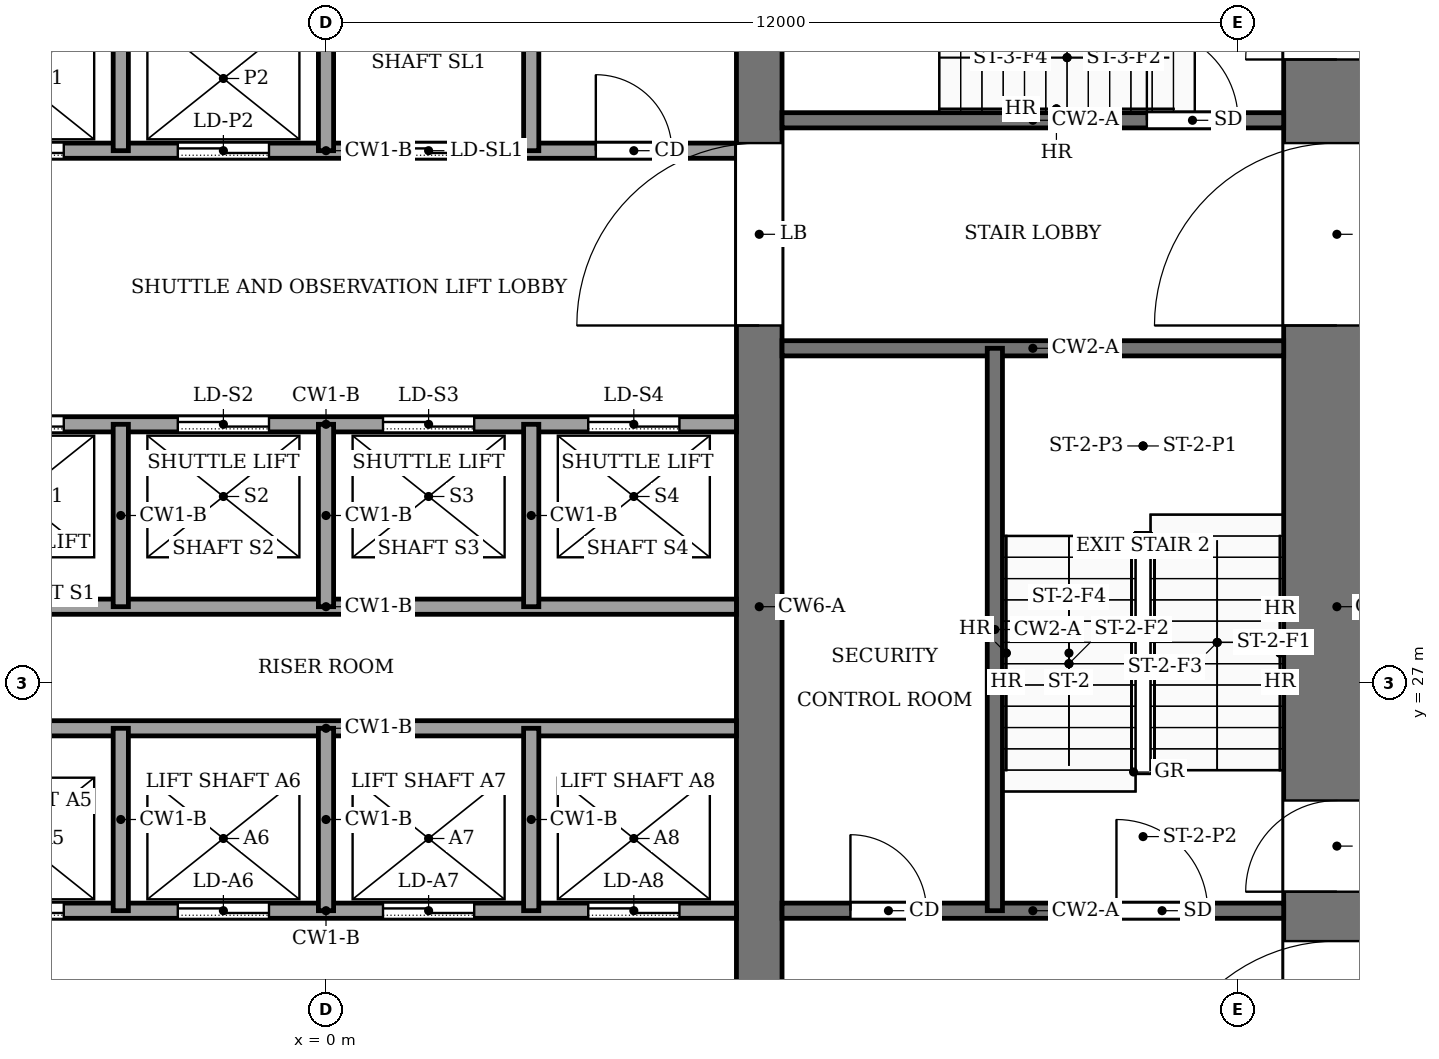
"""IFC4 building model, lengths in metres.
Left out: names, types, materials, properties, quantities, classifications, styles, units other than length and angle.
Written with IfcOpenShell. Run it as: python <this file> out.ifc"""

import sys

from ifc_helpers import new_model, si_unit, direction, frame, frame_2d, origin, place, context, subcontext, project, spatial, rectangle, extrude, element, fill, save


model = new_model("IFC4")
c1 = context("Model", 3, precision=1e-05, world=origin(), true_north=direction((0.0, 1.0)))
c2 = subcontext(c1, "Body", "Model", "MODEL_VIEW")
j1 = project(units=[si_unit("LENGTHUNIT", "METRE"), si_unit("PLANEANGLEUNIT", "RADIAN")], contexts=[c1])
p1 = place(None, origin())
s1 = spatial("IfcSite", under=j1, at=p1, CompositionType="ELEMENT")
p2 = place(p1, origin())
s2 = spatial("IfcBuilding", under=s1, at=p2, CompositionType="ELEMENT")
p3 = place(p2, origin())
s3 = spatial("IfcBuildingStorey", under=s2, at=p3, CompositionType="ELEMENT", Elevation=0.0)
p4 = place(p3, frame((13.3, 18.4, -0.45), z_axis=(0.0, 0.0, 1.0), x_axis=(0.0, 1.0, 0.0)))
e1 = element("IfcWall", 1, at=p4, inside=s3, PredefinedType="SHEAR", context=c2, shape_type="SweptSolid", body=[
    extrude(rectangle(XDim=19.2, YDim=1.4, at=frame_2d((9.6, 0.0))), origin(), (0.0, 0.0, 1.0), 9.32),
])
p5 = place(p4, frame((2.8, 0.0, 0.45)))
e2 = element("IfcOpeningElement", 2, at=p5, cuts=e1, PredefinedType="OPENING", context=c2, shape_type="SweptSolid", body=[
    extrude(rectangle(XDim=2.4, YDim=2.4, at=frame_2d((1.2, 1.2))), frame((0.0, 0.71, 0.0), z_axis=(0.0, -1.0, 0.0), x_axis=(1.0, 0.0, 0.0)), (0.0, 0.0, 1.0), 1.42),
])
p6 = place(p4, frame((13.3, 0.0, 0.45)))
e3 = element("IfcOpeningElement", 3, at=p6, cuts=e1, PredefinedType="OPENING", context=c2, shape_type="SweptSolid", body=[
    extrude(rectangle(XDim=2.4, YDim=2.4, at=frame_2d((1.2, 1.2))), frame((0.0, 0.71, 0.0), z_axis=(0.0, -1.0, 0.0), x_axis=(1.0, 0.0, 0.0)), (0.0, 0.0, 1.0), 1.42),
])
p7 = place(p4, frame((5.85, 0.0, 0.45)))
e4 = element("IfcOpeningElement", 4, at=p7, cuts=e1, PredefinedType="OPENING", context=c2, shape_type="SweptSolid", body=[
    extrude(rectangle(XDim=1.2, YDim=2.2, at=frame_2d((0.6, 1.1))), frame((0.0, 0.71, 0.0), z_axis=(0.0, -1.0, 0.0), x_axis=(1.0, 0.0, 0.0)), (0.0, 0.0, 1.0), 1.42),
])
p8 = place(p4, frame((16.8, 0.0, 0.45)))
e5 = element("IfcOpeningElement", 5, at=p8, cuts=e1, PredefinedType="OPENING", context=c2, shape_type="SweptSolid", body=[
    extrude(rectangle(XDim=1.2, YDim=2.2, at=frame_2d((0.6, 1.1))), frame((0.0, 0.71, 0.0), z_axis=(0.0, -1.0, 0.0), x_axis=(1.0, 0.0, 0.0)), (0.0, 0.0, 1.0), 1.42),
])
p9 = place(p3, frame((5.7, 18.4, -0.45), z_axis=(0.0, 0.0, 1.0), x_axis=(0.0, 1.0, 0.0)))
e6 = element("IfcWall", 6, at=p9, inside=s3, PredefinedType="SHEAR", context=c2, shape_type="SweptSolid", body=[
    extrude(rectangle(XDim=19.2, YDim=0.6, at=frame_2d((9.6, 0.0))), origin(), (0.0, 0.0, 1.0), 9.32),
])
p10 = place(p9, frame((13.3, 0.0, 0.45)))
e7 = element("IfcOpeningElement", 7, at=p10, cuts=e6, PredefinedType="OPENING", context=c2, shape_type="SweptSolid", body=[
    extrude(rectangle(XDim=2.4, YDim=2.4, at=frame_2d((1.2, 1.2))), frame((0.0, 0.31, 0.0), z_axis=(0.0, -1.0, 0.0), x_axis=(1.0, 0.0, 0.0)), (0.0, 0.0, 1.0), 0.62),
])
p11 = place(p3, frame((-5.4, 24.0, 0.0), z_axis=(0.0, 0.0, 1.0), x_axis=(1.0, 0.0, 0.0)))
e8 = element("IfcWall", 8, at=p11, inside=s3, PredefinedType="PARTITIONING", context=c2, shape_type="SweptSolid", body=[
    extrude(rectangle(XDim=10.8, YDim=0.2, at=frame_2d((5.4, 0.0))), origin(), (0.0, 0.0, 1.0), 8.87),
])
p12 = place(p11, frame((0.75, 0.0, 0.0)))
e9 = element("IfcOpeningElement", 9, at=p12, cuts=e8, PredefinedType="OPENING", context=c2, shape_type="SweptSolid", body=[
    extrude(rectangle(XDim=1.2, YDim=2.2, at=frame_2d((0.6, 1.1))), frame((0.0, 0.11, 0.0), z_axis=(0.0, -1.0, 0.0), x_axis=(1.0, 0.0, 0.0)), (0.0, 0.0, 1.0), 0.22),
])
p13 = place(p11, frame((3.45, 0.0, 0.0)))
e10 = element("IfcOpeningElement", 10, at=p13, cuts=e8, PredefinedType="OPENING", context=c2, shape_type="SweptSolid", body=[
    extrude(rectangle(XDim=1.2, YDim=2.2, at=frame_2d((0.6, 1.1))), frame((0.0, 0.11, 0.0), z_axis=(0.0, -1.0, 0.0), x_axis=(1.0, 0.0, 0.0)), (0.0, 0.0, 1.0), 0.22),
])
p14 = place(p11, frame((6.15, 0.0, 0.0)))
e11 = element("IfcOpeningElement", 11, at=p14, cuts=e8, PredefinedType="OPENING", context=c2, shape_type="SweptSolid", body=[
    extrude(rectangle(XDim=1.2, YDim=2.2, at=frame_2d((0.6, 1.1))), frame((0.0, 0.11, 0.0), z_axis=(0.0, -1.0, 0.0), x_axis=(1.0, 0.0, 0.0)), (0.0, 0.0, 1.0), 0.22),
])
p15 = place(p11, frame((8.85, 0.0, 0.0)))
e12 = element("IfcOpeningElement", 12, at=p15, cuts=e8, PredefinedType="OPENING", context=c2, shape_type="SweptSolid", body=[
    extrude(rectangle(XDim=1.2, YDim=2.2, at=frame_2d((0.6, 1.1))), frame((0.0, 0.11, 0.0), z_axis=(0.0, -1.0, 0.0), x_axis=(1.0, 0.0, 0.0)), (0.0, 0.0, 1.0), 0.22),
])
p16 = place(p3, frame((6.0, 24.0, 0.0), z_axis=(0.0, 0.0, 1.0), x_axis=(1.0, 0.0, 0.0)))
e13 = element("IfcWall", 13, at=p16, inside=s3, PredefinedType="PARTITIONING", context=c2, shape_type="SweptSolid", body=[
    extrude(rectangle(XDim=6.6, YDim=0.2, at=frame_2d((3.3, 0.0))), origin(), (0.0, 0.0, 1.0), 8.87),
])
p17 = place(p16, frame((0.9, 0.0, 0.0)))
e14 = element("IfcOpeningElement", 14, at=p17, cuts=e13, PredefinedType="OPENING", context=c2, shape_type="SweptSolid", body=[
    extrude(rectangle(XDim=1.0, YDim=2.1, at=frame_2d((0.5, 1.05))), frame((0.0, 0.11, 0.0), z_axis=(0.0, -1.0, 0.0), x_axis=(1.0, 0.0, 0.0)), (0.0, 0.0, 1.0), 0.22),
])
p18 = place(p16, frame((4.4, 0.0, 0.0)))
e15 = element("IfcOpeningElement", 15, at=p18, cuts=e13, PredefinedType="OPENING", context=c2, shape_type="SweptSolid", body=[
    extrude(rectangle(XDim=1.2, YDim=2.2, at=frame_2d((0.6, 1.1))), frame((0.0, 0.11, 0.0), z_axis=(0.0, -1.0, 0.0), x_axis=(1.0, 0.0, 0.0)), (0.0, 0.0, 1.0), 0.22),
])
for number, where, z_axis, x_axis in (
    (16, (-5.4, 26.4, 0.0), (0.0, 0.0, 1.0), (1.0, 0.0, 0.0)),
    (17, (-5.4, 28.0, 0.0), (0.0, 0.0, 1.0), (1.0, 0.0, 0.0)),
):
    element("IfcWall", number, at=place(p3, frame(where, z_axis=z_axis, x_axis=x_axis)), inside=s3, PredefinedType="PARTITIONING", context=c2, shape_type="SweptSolid", body=[
        extrude(rectangle(XDim=10.8, YDim=0.2, at=frame_2d((5.4, 0.0))), origin(), (0.0, 0.0, 1.0), 8.87),
    ])
p19 = place(p3, frame((-5.4, 30.4, 0.0), z_axis=(0.0, 0.0, 1.0), x_axis=(1.0, 0.0, 0.0)))
e18 = element("IfcWall", 18, at=p19, inside=s3, PredefinedType="PARTITIONING", context=c2, shape_type="SweptSolid", body=[
    extrude(rectangle(XDim=10.8, YDim=0.2, at=frame_2d((5.4, 0.0))), origin(), (0.0, 0.0, 1.0), 8.87),
])
p20 = place(p19, frame((0.75, 0.0, 0.0)))
e19 = element("IfcOpeningElement", 19, at=p20, cuts=e18, PredefinedType="OPENING", context=c2, shape_type="SweptSolid", body=[
    extrude(rectangle(XDim=1.2, YDim=2.2, at=frame_2d((0.6, 1.1))), frame((0.0, 0.11, 0.0), z_axis=(0.0, -1.0, 0.0), x_axis=(1.0, 0.0, 0.0)), (0.0, 0.0, 1.0), 0.22),
])
p21 = place(p19, frame((3.45, 0.0, 0.0)))
e20 = element("IfcOpeningElement", 20, at=p21, cuts=e18, PredefinedType="OPENING", context=c2, shape_type="SweptSolid", body=[
    extrude(rectangle(XDim=1.2, YDim=2.2, at=frame_2d((0.6, 1.1))), frame((0.0, 0.11, 0.0), z_axis=(0.0, -1.0, 0.0), x_axis=(1.0, 0.0, 0.0)), (0.0, 0.0, 1.0), 0.22),
])
p22 = place(p19, frame((6.15, 0.0, 0.0)))
e21 = element("IfcOpeningElement", 21, at=p22, cuts=e18, PredefinedType="OPENING", context=c2, shape_type="SweptSolid", body=[
    extrude(rectangle(XDim=1.2, YDim=2.2, at=frame_2d((0.6, 1.1))), frame((0.0, 0.11, 0.0), z_axis=(0.0, -1.0, 0.0), x_axis=(1.0, 0.0, 0.0)), (0.0, 0.0, 1.0), 0.22),
])
p23 = place(p19, frame((8.85, 0.0, 0.0)))
e22 = element("IfcOpeningElement", 22, at=p23, cuts=e18, PredefinedType="OPENING", context=c2, shape_type="SweptSolid", body=[
    extrude(rectangle(XDim=1.2, YDim=2.2, at=frame_2d((0.6, 1.1))), frame((0.0, 0.11, 0.0), z_axis=(0.0, -1.0, 0.0), x_axis=(1.0, 0.0, 0.0)), (0.0, 0.0, 1.0), 0.22),
])
p24 = place(p3, frame((6.0, 31.4, 0.0), z_axis=(0.0, 0.0, 1.0), x_axis=(1.0, 0.0, 0.0)))
e23 = element("IfcWall", 23, at=p24, inside=s3, PredefinedType="PARTITIONING", context=c2, shape_type="SweptSolid", body=[
    extrude(rectangle(XDim=6.6, YDim=0.2, at=frame_2d((3.3, 0.0))), origin(), (0.0, 0.0, 1.0), 8.87),
])
p25 = place(p3, frame((-5.4, 34.0, 0.0), z_axis=(0.0, 0.0, 1.0), x_axis=(1.0, 0.0, 0.0)))
e24 = element("IfcWall", 24, at=p25, inside=s3, PredefinedType="PARTITIONING", context=c2, shape_type="SweptSolid", body=[
    extrude(rectangle(XDim=10.8, YDim=0.2, at=frame_2d((5.4, 0.0))), origin(), (0.0, 0.0, 1.0), 8.87),
])
p26 = place(p25, frame((0.75, 0.0, 0.0)))
e25 = element("IfcOpeningElement", 25, at=p26, cuts=e24, PredefinedType="OPENING", context=c2, shape_type="SweptSolid", body=[
    extrude(rectangle(XDim=1.2, YDim=2.2, at=frame_2d((0.6, 1.1))), frame((0.0, 0.11, 0.0), z_axis=(0.0, -1.0, 0.0), x_axis=(1.0, 0.0, 0.0)), (0.0, 0.0, 1.0), 0.22),
])
p27 = place(p25, frame((3.45, 0.0, 0.0)))
e26 = element("IfcOpeningElement", 26, at=p27, cuts=e24, PredefinedType="OPENING", context=c2, shape_type="SweptSolid", body=[
    extrude(rectangle(XDim=1.2, YDim=2.2, at=frame_2d((0.6, 1.1))), frame((0.0, 0.11, 0.0), z_axis=(0.0, -1.0, 0.0), x_axis=(1.0, 0.0, 0.0)), (0.0, 0.0, 1.0), 0.22),
])
p28 = place(p25, frame((6.15, 0.0, 0.0)))
e27 = element("IfcOpeningElement", 27, at=p28, cuts=e24, PredefinedType="OPENING", context=c2, shape_type="SweptSolid", body=[
    extrude(rectangle(XDim=1.2, YDim=2.2, at=frame_2d((0.6, 1.1))), frame((0.0, 0.11, 0.0), z_axis=(0.0, -1.0, 0.0), x_axis=(1.0, 0.0, 0.0)), (0.0, 0.0, 1.0), 0.22),
])
p29 = place(p25, frame((8.95, 0.0, 0.0)))
e28 = element("IfcOpeningElement", 28, at=p29, cuts=e24, PredefinedType="OPENING", context=c2, shape_type="SweptSolid", body=[
    extrude(rectangle(XDim=1.0, YDim=2.1, at=frame_2d((0.5, 1.05))), frame((0.0, 0.11, 0.0), z_axis=(0.0, -1.0, 0.0), x_axis=(1.0, 0.0, 0.0)), (0.0, 0.0, 1.0), 0.22),
])
p30 = place(p3, frame((6.0, 34.4, 0.0), z_axis=(0.0, 0.0, 1.0), x_axis=(1.0, 0.0, 0.0)))
e29 = element("IfcWall", 29, at=p30, inside=s3, PredefinedType="PARTITIONING", context=c2, shape_type="SweptSolid", body=[
    extrude(rectangle(XDim=6.6, YDim=0.2, at=frame_2d((3.3, 0.0))), origin(), (0.0, 0.0, 1.0), 8.87),
])
p31 = place(p30, frame((4.8, 0.0, 0.0)))
e30 = element("IfcOpeningElement", 30, at=p31, cuts=e29, PredefinedType="OPENING", context=c2, shape_type="SweptSolid", body=[
    extrude(rectangle(XDim=1.2, YDim=2.2, at=frame_2d((0.6, 1.1))), frame((0.0, 0.11, 0.0), z_axis=(0.0, -1.0, 0.0), x_axis=(1.0, 0.0, 0.0)), (0.0, 0.0, 1.0), 0.22),
])
for number, where, z_axis, x_axis in (
    (31, (-2.7, 24.0, 0.0), (0.0, 0.0, 1.0), (0.0, 1.0, 0.0)),
    (32, (-2.7, 28.0, 0.0), (0.0, 0.0, 1.0), (0.0, 1.0, 0.0)),
):
    element("IfcWall", number, at=place(p3, frame(where, z_axis=z_axis, x_axis=x_axis)), inside=s3, PredefinedType="PARTITIONING", context=c2, shape_type="SweptSolid", body=[
        extrude(rectangle(XDim=2.4, YDim=0.2, at=frame_2d((1.2, 0.0))), origin(), (0.0, 0.0, 1.0), 8.87),
    ])
p32 = place(p3, frame((-2.7, 34.0, 0.0), z_axis=(0.0, 0.0, 1.0), x_axis=(0.0, 1.0, 0.0)))
e33 = element("IfcWall", 33, at=p32, inside=s3, PredefinedType="PARTITIONING", context=c2, shape_type="SweptSolid", body=[
    extrude(rectangle(XDim=3.6, YDim=0.2, at=frame_2d((1.8, 0.0))), origin(), (0.0, 0.0, 1.0), 8.87),
])
for number, where, z_axis, x_axis in (
    (34, (0.0, 24.0, 0.0), (0.0, 0.0, 1.0), (0.0, 1.0, 0.0)),
    (35, (0.0, 28.0, 0.0), (0.0, 0.0, 1.0), (0.0, 1.0, 0.0)),
):
    element("IfcWall", number, at=place(p3, frame(where, z_axis=z_axis, x_axis=x_axis)), inside=s3, PredefinedType="PARTITIONING", context=c2, shape_type="SweptSolid", body=[
        extrude(rectangle(XDim=2.4, YDim=0.2, at=frame_2d((1.2, 0.0))), origin(), (0.0, 0.0, 1.0), 8.87),
    ])
p33 = place(p3, frame((0.0, 34.0, 0.0), z_axis=(0.0, 0.0, 1.0), x_axis=(0.0, 1.0, 0.0)))
e36 = element("IfcWall", 36, at=p33, inside=s3, PredefinedType="PARTITIONING", context=c2, shape_type="SweptSolid", body=[
    extrude(rectangle(XDim=3.6, YDim=0.2, at=frame_2d((1.8, 0.0))), origin(), (0.0, 0.0, 1.0), 8.87),
])
for number, where, z_axis, x_axis in (
    (37, (2.7, 24.0, 0.0), (0.0, 0.0, 1.0), (0.0, 1.0, 0.0)),
    (38, (2.7, 28.0, 0.0), (0.0, 0.0, 1.0), (0.0, 1.0, 0.0)),
):
    element("IfcWall", number, at=place(p3, frame(where, z_axis=z_axis, x_axis=x_axis)), inside=s3, PredefinedType="PARTITIONING", context=c2, shape_type="SweptSolid", body=[
        extrude(rectangle(XDim=2.4, YDim=0.2, at=frame_2d((1.2, 0.0))), origin(), (0.0, 0.0, 1.0), 8.87),
    ])
p34 = place(p3, frame((2.7, 34.0, 0.0), z_axis=(0.0, 0.0, 1.0), x_axis=(0.0, 1.0, 0.0)))
e39 = element("IfcWall", 39, at=p34, inside=s3, PredefinedType="PARTITIONING", context=c2, shape_type="SweptSolid", body=[
    extrude(rectangle(XDim=3.6, YDim=0.2, at=frame_2d((1.8, 0.0))), origin(), (0.0, 0.0, 1.0), 8.87),
])
p35 = place(p3, frame((8.8, 24.0, 0.0), z_axis=(0.0, 0.0, 1.0), x_axis=(0.0, 1.0, 0.0)))
e40 = element("IfcWall", 40, at=p35, inside=s3, PredefinedType="PARTITIONING", context=c2, shape_type="SweptSolid", body=[
    extrude(rectangle(XDim=7.4, YDim=0.2, at=frame_2d((3.7, 0.0))), origin(), (0.0, 0.0, 1.0), 8.87),
])
p36 = place(p12, origin())
e41 = element("IfcDoor", 41, at=p36, inside=s3, OperationType="SLIDING_TO_LEFT", PredefinedType="DOOR", context=c2, shape_type="SweptSolid", body=[
    extrude(rectangle(XDim=1.2, YDim=2.2, at=frame_2d((0.6, 1.1))), frame((0.0, 0.025, 0.0), z_axis=(0.0, -1.0, 0.0), x_axis=(1.0, 0.0, 0.0)), (0.0, 0.0, 1.0), 0.05),
])
fill(e9, e41)
p37 = place(p13, origin())
e42 = element("IfcDoor", 42, at=p37, inside=s3, OperationType="SLIDING_TO_LEFT", PredefinedType="DOOR", context=c2, shape_type="SweptSolid", body=[
    extrude(rectangle(XDim=1.2, YDim=2.2, at=frame_2d((0.6, 1.1))), frame((0.0, 0.025, 0.0), z_axis=(0.0, -1.0, 0.0), x_axis=(1.0, 0.0, 0.0)), (0.0, 0.0, 1.0), 0.05),
])
fill(e10, e42)
p38 = place(p14, origin())
e43 = element("IfcDoor", 43, at=p38, inside=s3, OperationType="SLIDING_TO_LEFT", PredefinedType="DOOR", context=c2, shape_type="SweptSolid", body=[
    extrude(rectangle(XDim=1.2, YDim=2.2, at=frame_2d((0.6, 1.1))), frame((0.0, 0.025, 0.0), z_axis=(0.0, -1.0, 0.0), x_axis=(1.0, 0.0, 0.0)), (0.0, 0.0, 1.0), 0.05),
])
fill(e11, e43)
p39 = place(p15, origin())
e44 = element("IfcDoor", 44, at=p39, inside=s3, OperationType="SLIDING_TO_LEFT", PredefinedType="DOOR", context=c2, shape_type="SweptSolid", body=[
    extrude(rectangle(XDim=1.2, YDim=2.2, at=frame_2d((0.6, 1.1))), frame((0.0, 0.025, 0.0), z_axis=(0.0, -1.0, 0.0), x_axis=(1.0, 0.0, 0.0)), (0.0, 0.0, 1.0), 0.05),
])
fill(e12, e44)
p40 = place(p20, origin())
e45 = element("IfcDoor", 45, at=p40, inside=s3, OperationType="SLIDING_TO_LEFT", PredefinedType="DOOR", context=c2, shape_type="SweptSolid", body=[
    extrude(rectangle(XDim=1.2, YDim=2.2, at=frame_2d((0.6, 1.1))), frame((0.0, 0.025, 0.0), z_axis=(0.0, -1.0, 0.0), x_axis=(1.0, 0.0, 0.0)), (0.0, 0.0, 1.0), 0.05),
])
fill(e19, e45)
p41 = place(p21, origin())
e46 = element("IfcDoor", 46, at=p41, inside=s3, OperationType="SLIDING_TO_LEFT", PredefinedType="DOOR", context=c2, shape_type="SweptSolid", body=[
    extrude(rectangle(XDim=1.2, YDim=2.2, at=frame_2d((0.6, 1.1))), frame((0.0, 0.025, 0.0), z_axis=(0.0, -1.0, 0.0), x_axis=(1.0, 0.0, 0.0)), (0.0, 0.0, 1.0), 0.05),
])
fill(e20, e46)
p42 = place(p22, origin())
e47 = element("IfcDoor", 47, at=p42, inside=s3, OperationType="SLIDING_TO_LEFT", PredefinedType="DOOR", context=c2, shape_type="SweptSolid", body=[
    extrude(rectangle(XDim=1.2, YDim=2.2, at=frame_2d((0.6, 1.1))), frame((0.0, 0.025, 0.0), z_axis=(0.0, -1.0, 0.0), x_axis=(1.0, 0.0, 0.0)), (0.0, 0.0, 1.0), 0.05),
])
fill(e21, e47)
p43 = place(p23, origin())
e48 = element("IfcDoor", 48, at=p43, inside=s3, OperationType="SLIDING_TO_LEFT", PredefinedType="DOOR", context=c2, shape_type="SweptSolid", body=[
    extrude(rectangle(XDim=1.2, YDim=2.2, at=frame_2d((0.6, 1.1))), frame((0.0, 0.025, 0.0), z_axis=(0.0, -1.0, 0.0), x_axis=(1.0, 0.0, 0.0)), (0.0, 0.0, 1.0), 0.05),
])
fill(e22, e48)
p44 = place(p26, origin())
e49 = element("IfcDoor", 49, at=p44, inside=s3, OperationType="SLIDING_TO_LEFT", PredefinedType="DOOR", context=c2, shape_type="SweptSolid", body=[
    extrude(rectangle(XDim=1.2, YDim=2.2, at=frame_2d((0.6, 1.1))), frame((0.0, 0.025, 0.0), z_axis=(0.0, -1.0, 0.0), x_axis=(1.0, 0.0, 0.0)), (0.0, 0.0, 1.0), 0.05),
])
fill(e25, e49)
p45 = place(p27, origin())
e50 = element("IfcDoor", 50, at=p45, inside=s3, OperationType="SLIDING_TO_LEFT", PredefinedType="DOOR", context=c2, shape_type="SweptSolid", body=[
    extrude(rectangle(XDim=1.2, YDim=2.2, at=frame_2d((0.6, 1.1))), frame((0.0, 0.025, 0.0), z_axis=(0.0, -1.0, 0.0), x_axis=(1.0, 0.0, 0.0)), (0.0, 0.0, 1.0), 0.05),
])
fill(e26, e50)
p46 = place(p28, origin())
e51 = element("IfcDoor", 51, at=p46, inside=s3, OperationType="SLIDING_TO_LEFT", PredefinedType="DOOR", context=c2, shape_type="SweptSolid", body=[
    extrude(rectangle(XDim=1.2, YDim=2.2, at=frame_2d((0.6, 1.1))), frame((0.0, 0.025, 0.0), z_axis=(0.0, -1.0, 0.0), x_axis=(1.0, 0.0, 0.0)), (0.0, 0.0, 1.0), 0.05),
])
fill(e27, e51)
p47 = place(p17, origin())
e52 = element("IfcDoor", 52, at=p47, inside=s3, OperationType="SINGLE_SWING_LEFT", PredefinedType="DOOR", context=c2, shape_type="SweptSolid", body=[
    extrude(rectangle(XDim=1.0, YDim=2.1, at=frame_2d((0.5, 1.05))), frame((0.0, 0.025, 0.0), z_axis=(0.0, -1.0, 0.0), x_axis=(1.0, 0.0, 0.0)), (0.0, 0.0, 1.0), 0.05),
])
fill(e14, e52)
p48 = place(p29, origin())
e53 = element("IfcDoor", 53, at=p48, inside=s3, OperationType="SINGLE_SWING_LEFT", PredefinedType="DOOR", context=c2, shape_type="SweptSolid", body=[
    extrude(rectangle(XDim=1.0, YDim=2.1, at=frame_2d((0.5, 1.05))), frame((0.0, 0.025, 0.0), z_axis=(0.0, -1.0, 0.0), x_axis=(1.0, 0.0, 0.0)), (0.0, 0.0, 1.0), 0.05),
])
fill(e28, e53)
p49 = place(p18, origin())
e54 = element("IfcDoor", 54, at=p49, inside=s3, OperationType="SINGLE_SWING_LEFT", PredefinedType="DOOR", context=c2, shape_type="SweptSolid", body=[
    extrude(rectangle(XDim=1.2, YDim=2.2, at=frame_2d((0.6, 1.1))), frame((0.0, 0.025, 0.0), z_axis=(0.0, -1.0, 0.0), x_axis=(1.0, 0.0, 0.0)), (0.0, 0.0, 1.0), 0.05),
])
fill(e15, e54)
p50 = place(p31, origin())
e55 = element("IfcDoor", 55, at=p50, inside=s3, OperationType="SINGLE_SWING_RIGHT", PredefinedType="DOOR", context=c2, shape_type="SweptSolid", body=[
    extrude(rectangle(XDim=1.2, YDim=2.2, at=frame_2d((0.6, 1.1))), frame((0.0, 0.025, 0.0), z_axis=(0.0, -1.0, 0.0), x_axis=(1.0, 0.0, 0.0)), (0.0, 0.0, 1.0), 0.05),
])
fill(e30, e55)
p51 = place(p10, origin())
e56 = element("IfcDoor", 56, at=p51, inside=s3, OperationType="DOUBLE_DOOR_SINGLE_SWING", PredefinedType="DOOR", context=c2, shape_type="SweptSolid", body=[
    extrude(rectangle(XDim=2.4, YDim=2.4, at=frame_2d((1.2, 1.2))), frame((0.0, 0.025, 0.0), z_axis=(0.0, -1.0, 0.0), x_axis=(1.0, 0.0, 0.0)), (0.0, 0.0, 1.0), 0.05),
])
fill(e7, e56)
p52 = place(p5, origin())
e57 = element("IfcDoor", 57, at=p52, inside=s3, OperationType="DOUBLE_DOOR_SINGLE_SWING", PredefinedType="DOOR", context=c2, shape_type="SweptSolid", body=[
    extrude(rectangle(XDim=2.4, YDim=2.4, at=frame_2d((1.2, 1.2))), frame((0.0, 0.025, 0.0), z_axis=(0.0, -1.0, 0.0), x_axis=(1.0, 0.0, 0.0)), (0.0, 0.0, 1.0), 0.05),
])
fill(e2, e57)
p53 = place(p6, origin())
e58 = element("IfcDoor", 58, at=p53, inside=s3, OperationType="DOUBLE_DOOR_SINGLE_SWING", PredefinedType="DOOR", context=c2, shape_type="SweptSolid", body=[
    extrude(rectangle(XDim=2.4, YDim=2.4, at=frame_2d((1.2, 1.2))), frame((0.0, 0.025, 0.0), z_axis=(0.0, -1.0, 0.0), x_axis=(1.0, 0.0, 0.0)), (0.0, 0.0, 1.0), 0.05),
])
fill(e3, e58)
p54 = place(p7, origin())
e59 = element("IfcDoor", 59, at=p54, inside=s3, OperationType="SINGLE_SWING_LEFT", PredefinedType="DOOR", context=c2, shape_type="SweptSolid", body=[
    extrude(rectangle(XDim=1.2, YDim=2.2, at=frame_2d((0.6, 1.1))), frame((0.0, 0.7, 0.0), z_axis=(0.0, -1.0, 0.0), x_axis=(1.0, 0.0, 0.0)), (0.0, 0.0, 1.0), 0.05),
])
fill(e4, e59)
p55 = place(p8, origin())
e60 = element("IfcDoor", 60, at=p55, inside=s3, OperationType="SINGLE_SWING_RIGHT", PredefinedType="DOOR", context=c2, shape_type="SweptSolid", body=[
    extrude(rectangle(XDim=1.2, YDim=2.2, at=frame_2d((0.6, 1.1))), frame((0.0, 0.7, 0.0), z_axis=(0.0, -1.0, 0.0), x_axis=(1.0, 0.0, 0.0)), (0.0, 0.0, 1.0), 0.05),
])
fill(e5, e60)
save(model, sys.argv[1])
